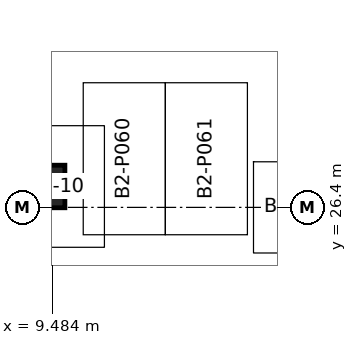
"""IFC4 building model, lengths in metres.
Left out: names, types, materials, properties, quantities, classifications, styles, units other than length and angle.
Written with IfcOpenShell. Run it as: python <this file> out.ifc"""

import sys

from ifc_helpers import new_model, si_unit, direction, frame, frame_2d, origin, origin_2d, place, context, subcontext, project, spatial, rectangle, extrude, element, save


model = new_model("IFC4")
c1 = context("Model", 3, precision=1e-05, world=origin(), true_north=direction((0.0, 1.0)))
c2 = subcontext(c1, "Body", "Model", "MODEL_VIEW")
j1 = project(units=[si_unit("LENGTHUNIT", "METRE"), si_unit("PLANEANGLEUNIT", "RADIAN")], contexts=[c1])
p1 = place(None, origin())
s1 = spatial("IfcSite", under=j1, at=p1, CompositionType="ELEMENT")
p2 = place(p1, origin())
s2 = spatial("IfcBuilding", under=s1, at=p2, CompositionType="ELEMENT")
p3 = place(p2, frame((0.0, 0.0, -9.0)))
s3 = spatial("IfcBuildingStorey", under=s2, at=p3, CompositionType="ELEMENT", Elevation=-9.0)
p4 = place(p3, frame((9.197, 27.087, 0.0), z_axis=(0.0, 0.0, 1.0), x_axis=(-0.609232107146, 0.792991954324, 0.0)))
e1 = element("IfcColumn", 1, at=p4, inside=s3, PredefinedType="COLUMN", context=c2, shape_type="SweptSolid", body=[
    extrude(rectangle(XDim=1.4, YDim=1.4, at=origin_2d()), origin(), (0.0, 0.0, 1.0), 4.5),
])
p5 = place(p3, frame((16.802, 40.787, 0.0), z_axis=(0.0, 0.0, 1.0), x_axis=(0.607919576061, -0.793998607707, 0.0)))
e2 = element("IfcWall", 2, at=p5, inside=s3, PredefinedType="SOLIDWALL", context=c2, shape_type="SweptSolid", body=[
    extrude(rectangle(XDim=12.988, YDim=0.5, at=frame_2d((6.494, 0.0))), origin(), (0.0, 0.0, 1.0), 4.5),
])
save(model, sys.argv[1])
